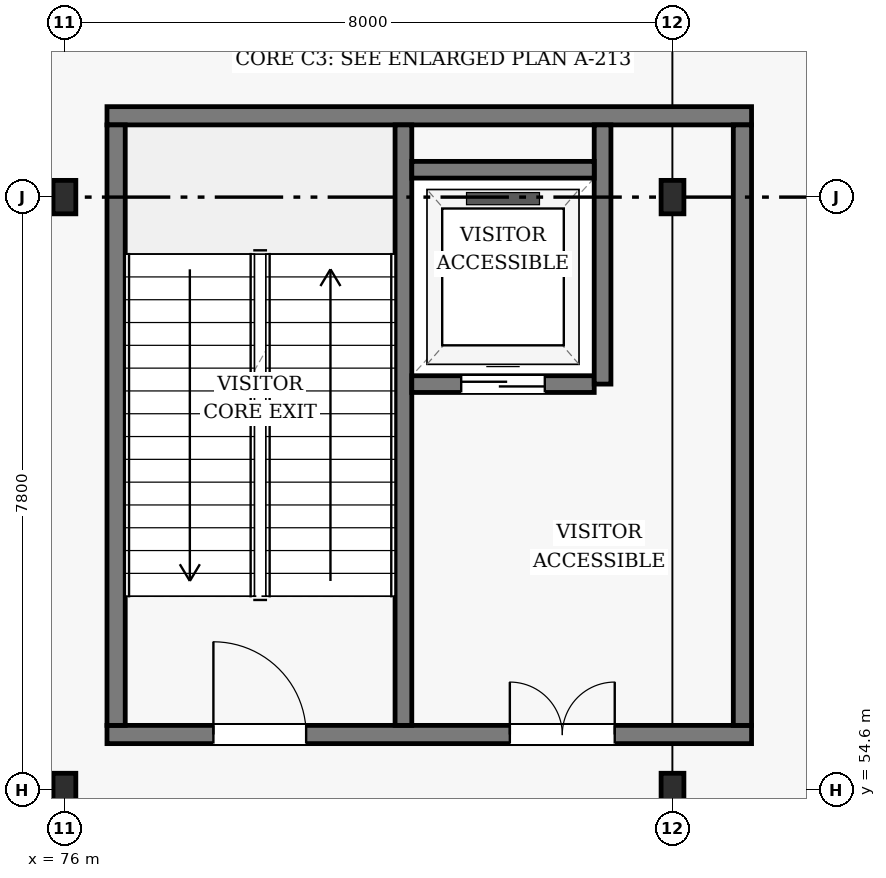
"""IFC4 building model, lengths in metres.
Left out: names, types, materials, properties, quantities, classifications, styles, units other than length and angle.
Written with IfcOpenShell. Run it as: python <this file> out.ifc"""

import sys

from ifc_helpers import new_model, si_unit, direction, frame, frame_2d, origin, origin_2d, place, context, subcontext, project, spatial, rectangle, i_section, extrude, element, fill, save


model = new_model("IFC4")
c1 = context("Model", 3, precision=1e-05, world=origin(), true_north=direction((0.0, 1.0)))
c2 = subcontext(c1, "Body", "Model", "MODEL_VIEW")
j1 = project(units=[si_unit("LENGTHUNIT", "METRE"), si_unit("PLANEANGLEUNIT", "RADIAN")], contexts=[c1])
p1 = place(None, origin())
s1 = spatial("IfcSite", under=j1, at=p1, CompositionType="ELEMENT")
p2 = place(p1, origin())
s2 = spatial("IfcBuilding", under=s1, at=p2, CompositionType="ELEMENT")
p3 = place(p2, origin())
s3 = spatial("IfcBuildingStorey", under=s2, at=p3, CompositionType="ELEMENT", Elevation=0.0)
for number, where, z_axis, x_axis in (
    (1, (76.0, 54.6, 0.0), (0.0, 0.0, 1.0), (1.0, 0.0, 0.0)),
    (2, (76.0, 62.4, 0.0), (0.0, 0.0, 1.0), (1.0, 0.0, 0.0)),
    (3, (84.0, 54.6, 0.0), (0.0, 0.0, 1.0), (1.0, 0.0, 0.0)),
    (4, (84.0, 62.4, 0.0), (0.0, 0.0, 1.0), (1.0, 0.0, 0.0)),
):
    element("IfcColumn", number, at=place(p3, frame(where, z_axis=z_axis, x_axis=x_axis)), inside=s3, PredefinedType="COLUMN", context=c2, shape_type="SweptSolid", body=[
        extrude(i_section(OverallWidth=0.3, OverallDepth=0.44, WebThickness=0.011, FlangeThickness=0.018, FilletRadius=0.024, at=origin_2d()), origin(), (0.0, 0.0, 1.0), 4.8),
    ])
p4 = place(p3, frame((76.56, 55.33, 0.0), z_axis=(0.0, 0.0, 1.0), x_axis=(1.0, 0.0, 0.0)))
e5 = element("IfcWall", 5, at=p4, inside=s3, PredefinedType="SHEAR", context=c2, shape_type="SweptSolid", body=[
    extrude(rectangle(XDim=8.48, YDim=0.24, at=frame_2d((4.24, 0.0))), origin(), (0.0, 0.0, 1.0), 4.56),
])
p5 = place(p4, frame((1.4, 0.0, 0.0)))
e6 = element("IfcOpeningElement", 6, at=p5, cuts=e5, PredefinedType="OPENING", context=c2, shape_type="SweptSolid", body=[
    extrude(rectangle(XDim=1.22, YDim=2.18, at=frame_2d((0.61, 1.09))), frame((0.0, 0.13, 0.0), z_axis=(0.0, -1.0, 0.0), x_axis=(1.0, 0.0, 0.0)), (0.0, 0.0, 1.0), 0.26),
])
p6 = place(p4, frame((5.3, 0.0, 0.0)))
e7 = element("IfcOpeningElement", 7, at=p6, cuts=e5, PredefinedType="OPENING", context=c2, shape_type="SweptSolid", body=[
    extrude(rectangle(XDim=1.38, YDim=2.15, at=frame_2d((0.69, 1.075))), frame((0.0, 0.13, 0.0), z_axis=(0.0, -1.0, 0.0), x_axis=(1.0, 0.0, 0.0)), (0.0, 0.0, 1.0), 0.26),
])
p7 = place(p3, frame((76.56, 63.47, 0.0), z_axis=(0.0, 0.0, 1.0), x_axis=(1.0, 0.0, 0.0)))
e8 = element("IfcWall", 8, at=p7, inside=s3, PredefinedType="SHEAR", context=c2, shape_type="SweptSolid", body=[
    extrude(rectangle(XDim=8.48, YDim=0.24, at=frame_2d((4.24, 0.0))), origin(), (0.0, 0.0, 1.0), 4.56),
])
p8 = place(p3, frame((76.68, 55.45, 0.0), z_axis=(0.0, 0.0, 1.0), x_axis=(0.0, 1.0, 0.0)))
e9 = element("IfcWall", 9, at=p8, inside=s3, PredefinedType="SHEAR", context=c2, shape_type="SweptSolid", body=[
    extrude(rectangle(XDim=7.9, YDim=0.24, at=frame_2d((3.95, 0.0))), origin(), (0.0, 0.0, 1.0), 4.56),
])
p9 = place(p3, frame((80.46, 55.45, 0.0), z_axis=(0.0, 0.0, 1.0), x_axis=(0.0, 1.0, 0.0)))
e10 = element("IfcWall", 10, at=p9, inside=s3, PredefinedType="SHEAR", context=c2, shape_type="SweptSolid", body=[
    extrude(rectangle(XDim=7.9, YDim=0.22, at=frame_2d((3.95, 0.0))), origin(), (0.0, 0.0, 1.0), 4.56),
])
p10 = place(p3, frame((84.92, 55.45, 0.0), z_axis=(0.0, 0.0, 1.0), x_axis=(0.0, 1.0, 0.0)))
e11 = element("IfcWall", 11, at=p10, inside=s3, PredefinedType="SHEAR", context=c2, shape_type="SweptSolid", body=[
    extrude(rectangle(XDim=7.9, YDim=0.24, at=frame_2d((3.95, 0.0))), origin(), (0.0, 0.0, 1.0), 4.56),
])
p11 = place(p3, frame((80.57, 59.94, 0.0), z_axis=(0.0, 0.0, 1.0), x_axis=(1.0, 0.0, 0.0)))
e12 = element("IfcWall", 12, at=p11, inside=s3, PredefinedType="SHEAR", context=c2, shape_type="SweptSolid", body=[
    extrude(rectangle(XDim=2.4, YDim=0.22, at=frame_2d((1.2, 0.0))), origin(), (0.0, 0.0, 1.0), 4.56),
])
p12 = place(p11, frame((0.65, 0.0, 0.0)))
e13 = element("IfcOpeningElement", 13, at=p12, cuts=e12, PredefinedType="OPENING", context=c2, shape_type="SweptSolid", body=[
    extrude(rectangle(XDim=1.1, YDim=2.15, at=frame_2d((0.55, 1.075))), frame((0.0, 0.12, 0.0), z_axis=(0.0, -1.0, 0.0), x_axis=(1.0, 0.0, 0.0)), (0.0, 0.0, 1.0), 0.24),
])
p13 = place(p3, frame((83.08, 59.94, 0.0), z_axis=(0.0, 0.0, 1.0), x_axis=(0.0, 1.0, 0.0)))
e14 = element("IfcWall", 14, at=p13, inside=s3, PredefinedType="SHEAR", context=c2, shape_type="SweptSolid", body=[
    extrude(rectangle(XDim=3.41, YDim=0.22, at=frame_2d((1.705, 0.0))), origin(), (0.0, 0.0, 1.0), 4.56),
])
p14 = place(p3, frame((80.57, 62.76, 0.0), z_axis=(0.0, 0.0, 1.0), x_axis=(1.0, 0.0, 0.0)))
e15 = element("IfcWall", 15, at=p14, inside=s3, PredefinedType="SHEAR", context=c2, shape_type="SweptSolid", body=[
    extrude(rectangle(XDim=2.4, YDim=0.22, at=frame_2d((1.2, 0.0))), origin(), (0.0, 0.0, 1.0), 4.56),
])
p15 = place(p5, origin())
e16 = element("IfcDoor", 16, at=p15, inside=s3, OperationType="SINGLE_SWING_LEFT", PredefinedType="DOOR", context=c2, shape_type="SweptSolid", body=[
    extrude(rectangle(XDim=1.22, YDim=2.18, at=frame_2d((0.61, 1.09))), frame((0.0, 0.025, 0.0), z_axis=(0.0, -1.0, 0.0), x_axis=(1.0, 0.0, 0.0)), (0.0, 0.0, 1.0), 0.05),
])
fill(e6, e16)
p16 = place(p6, frame((1.38, 0.0, 0.0), z_axis=(0.0, 0.0, 1.0), x_axis=(-1.0, 0.0, 0.0)))
e17 = element("IfcDoor", 17, at=p16, inside=s3, OperationType="DOUBLE_DOOR_SINGLE_SWING", PredefinedType="DOOR", context=c2, shape_type="SweptSolid", body=[
    extrude(rectangle(XDim=1.38, YDim=2.15, at=frame_2d((0.69, 1.075))), frame((0.0, 0.025, 0.0), z_axis=(0.0, -1.0, 0.0), x_axis=(1.0, 0.0, 0.0)), (0.0, 0.0, 1.0), 0.05),
])
fill(e7, e17)
p17 = place(p12, origin())
e18 = element("IfcDoor", 18, at=p17, inside=s3, OperationType="SLIDING_TO_LEFT", PredefinedType="DOOR", context=c2, shape_type="SweptSolid", body=[
    extrude(rectangle(XDim=1.1, YDim=2.15, at=frame_2d((0.55, 1.075))), frame((0.0, 0.025, 0.0), z_axis=(0.0, -1.0, 0.0), x_axis=(1.0, 0.0, 0.0)), (0.0, 0.0, 1.0), 0.05),
])
fill(e13, e18)
save(model, sys.argv[1])
